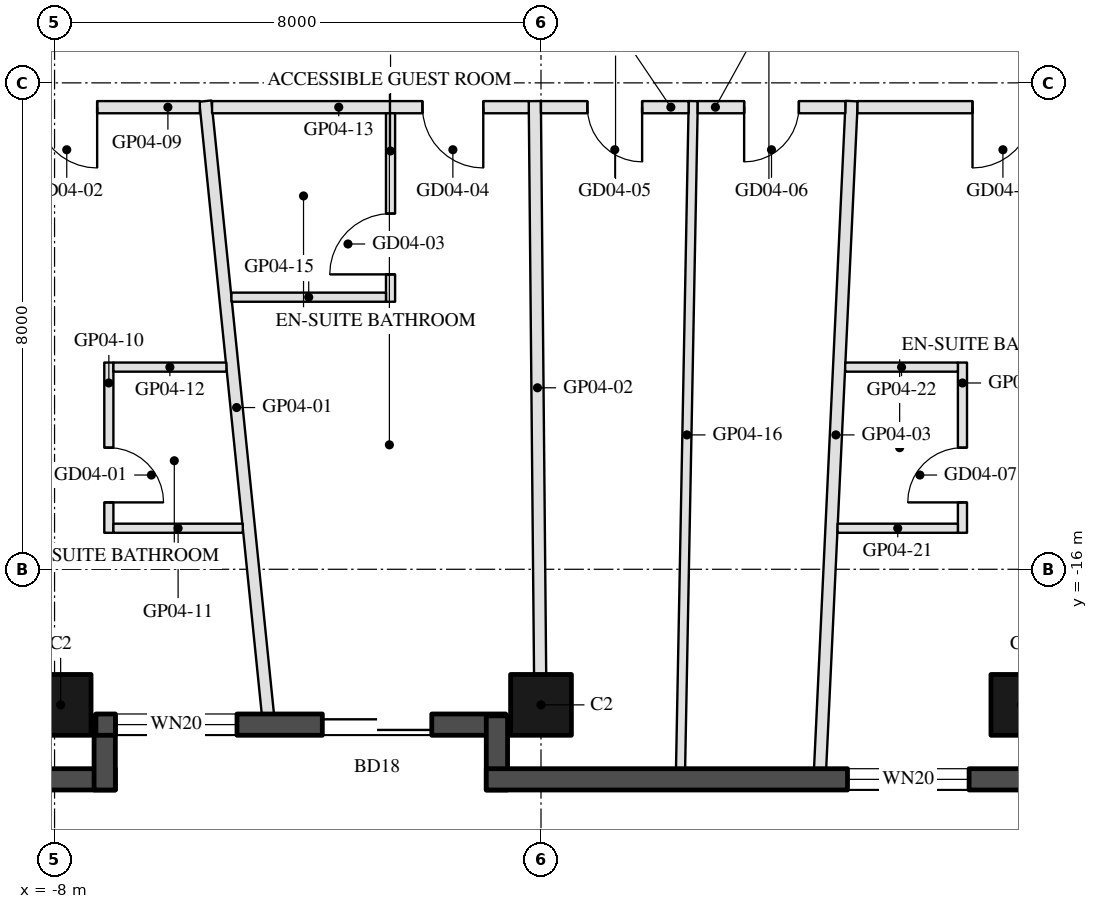
"""IFC4 building model, lengths in metres.
Left out: names, types, materials, properties, quantities, classifications, styles, units other than length and angle.
Written with IfcOpenShell. Run it as: python <this file> out.ifc"""

import sys

from ifc_helpers import new_model, si_unit, direction, frame, frame_2d, origin, origin_2d, place, context, subcontext, project, spatial, rectangle, hollow_rectangle, extrude, element, fill, save


model = new_model("IFC4")
c1 = context("Model", 3, precision=1e-05, world=origin(), true_north=direction((0.0, 1.0)))
c2 = subcontext(c1, "Body", "Model", "MODEL_VIEW")
j1 = project(units=[si_unit("LENGTHUNIT", "METRE"), si_unit("PLANEANGLEUNIT", "RADIAN")], contexts=[c1])
p1 = place(None, origin())
s1 = spatial("IfcSite", under=j1, at=p1, CompositionType="ELEMENT")
p2 = place(p1, origin())
s2 = spatial("IfcBuilding", under=s1, at=p2, CompositionType="ELEMENT")
p3 = place(p2, frame((0.0, 0.0, 72.4)))
s3 = spatial("IfcBuildingStorey", under=s2, at=p3, CompositionType="ELEMENT", Elevation=72.4)
for number, where, z_axis, x_axis in (
    (1, (-7.9, -18.23, 0.0), (0.0, 0.0, 1.0), (-1.0, 0.0, 0.0)),
    (2, (0.0, -18.23, 0.0), (0.0, 0.0, 1.0), (-1.0, 0.0, 0.0)),
    (3, (7.9, -18.23, 0.0), (0.0, 0.0, 1.0), (-1.0, 0.0, 0.0)),
):
    element("IfcColumn", number, at=place(p3, frame(where, z_axis=z_axis, x_axis=x_axis)), inside=s3, PredefinedType="COLUMN", context=c2, shape_type="SweptSolid", body=[
        extrude(hollow_rectangle(XDim=1.0, YDim=1.0, WallThickness=0.045, at=origin_2d()), origin(), (0.0, 0.0, 1.0), 3.7),
    ])
p4 = place(p3, frame((-18.816, -19.455, 0.0), z_axis=(0.0, 0.0, 1.0), x_axis=(1.0, 0.0, 0.0)))
e4 = element("IfcWall", 4, at=p4, inside=s3, PredefinedType="SOLIDWALL", context=c2, shape_type="SweptSolid", body=[
    extrude(rectangle(XDim=11.816, YDim=0.35, at=frame_2d((5.908, 0.0))), origin(), (0.0, 0.0, 1.0), 3.55),
])
p5 = place(p4, frame((0.381, 0.0, 0.3)))
e5 = element("IfcOpeningElement", 5, at=p5, cuts=e4, PredefinedType="OPENING", context=c2, shape_type="SweptSolid", body=[
    extrude(rectangle(XDim=1.7, YDim=2.65, at=frame_2d((0.85, 1.325))), frame((0.0, 0.185, 0.0), z_axis=(0.0, -1.0, 0.0), x_axis=(1.0, 0.0, 0.0)), (0.0, 0.0, 1.0), 0.37),
])
p6 = place(p4, frame((7.665, 0.0, 0.0)))
e6 = element("IfcOpeningElement", 6, at=p6, cuts=e4, PredefinedType="OPENING", context=c2, shape_type="SweptSolid", body=[
    extrude(rectangle(XDim=2.4, YDim=2.4, at=frame_2d((1.2, 1.2))), frame((0.0, 0.185, 0.0), z_axis=(0.0, -1.0, 0.0), x_axis=(1.0, 0.0, 0.0)), (0.0, 0.0, 1.0), 0.37),
])
p7 = place(p4, frame((3.866, 0.0, 0.3)))
e7 = element("IfcOpeningElement", 7, at=p7, cuts=e4, PredefinedType="OPENING", context=c2, shape_type="SweptSolid", body=[
    extrude(rectangle(XDim=1.5, YDim=2.65, at=frame_2d((0.75, 1.325))), frame((0.0, 0.185, 0.0), z_axis=(0.0, -1.0, 0.0), x_axis=(1.0, 0.0, 0.0)), (0.0, 0.0, 1.0), 0.37),
])
p8 = place(p4, frame((5.666, 0.0, 0.3)))
e8 = element("IfcOpeningElement", 8, at=p8, cuts=e4, PredefinedType="OPENING", context=c2, shape_type="SweptSolid", body=[
    extrude(rectangle(XDim=1.5, YDim=2.65, at=frame_2d((0.75, 1.325))), frame((0.0, 0.185, 0.0), z_axis=(0.0, -1.0, 0.0), x_axis=(1.0, 0.0, 0.0)), (0.0, 0.0, 1.0), 0.37),
])
p9 = place(p3, frame((-7.175, -19.63, 0.0), z_axis=(0.0, 0.0, 1.0), x_axis=(0.0, 1.0, 0.0)))
e9 = element("IfcWall", 9, at=p9, inside=s3, PredefinedType="SOLIDWALL", context=c2, shape_type="SweptSolid", body=[
    extrude(rectangle(XDim=1.22, YDim=0.35, at=frame_2d((0.61, 0.0))), origin(), (0.0, 0.0, 1.0), 3.55),
])
p10 = place(p3, frame((-7.32, -18.555, 0.0), z_axis=(0.0, 0.0, 1.0), x_axis=(1.0, 0.0, 0.0)))
e10 = element("IfcWall", 10, at=p10, inside=s3, PredefinedType="SOLIDWALL", context=c2, shape_type="SweptSolid", body=[
    extrude(rectangle(XDim=6.74, YDim=0.35, at=frame_2d((3.37, 0.0))), origin(), (0.0, 0.0, 1.0), 3.55),
])
p11 = place(p10, frame((0.32, 0.0, 0.3)))
e11 = element("IfcOpeningElement", 11, at=p11, cuts=e10, PredefinedType="OPENING", context=c2, shape_type="SweptSolid", body=[
    extrude(rectangle(XDim=2.0, YDim=2.65, at=frame_2d((1.0, 1.325))), frame((0.0, 0.185, 0.0), z_axis=(0.0, -1.0, 0.0), x_axis=(1.0, 0.0, 0.0)), (0.0, 0.0, 1.0), 0.37),
])
p12 = place(p10, frame((3.724, 0.0, 0.0)))
e12 = element("IfcOpeningElement", 12, at=p12, cuts=e10, PredefinedType="OPENING", context=c2, shape_type="SweptSolid", body=[
    extrude(rectangle(XDim=1.8, YDim=2.4, at=frame_2d((0.9, 1.2))), frame((0.0, 0.185, 0.0), z_axis=(0.0, -1.0, 0.0), x_axis=(1.0, 0.0, 0.0)), (0.0, 0.0, 1.0), 0.37),
])
p13 = place(p3, frame((-0.725, -18.41, 0.0), z_axis=(0.0, 0.0, 1.0), x_axis=(0.0, -1.0, 0.0)))
e13 = element("IfcWall", 13, at=p13, inside=s3, PredefinedType="SOLIDWALL", context=c2, shape_type="SweptSolid", body=[
    extrude(rectangle(XDim=1.22, YDim=0.35, at=frame_2d((0.61, 0.0))), origin(), (0.0, 0.0, 1.0), 3.55),
])
p14 = place(p3, frame((-0.9, -19.455, 0.0), z_axis=(0.0, 0.0, 1.0), x_axis=(1.0, 0.0, 0.0)))
e14 = element("IfcWall", 14, at=p14, inside=s3, PredefinedType="SOLIDWALL", context=c2, shape_type="SweptSolid", body=[
    extrude(rectangle(XDim=9.7, YDim=0.35, at=frame_2d((4.85, 0.0))), origin(), (0.0, 0.0, 1.0), 3.55),
])
p15 = place(p14, frame((5.94, 0.0, 0.3)))
e15 = element("IfcOpeningElement", 15, at=p15, cuts=e14, PredefinedType="OPENING", context=c2, shape_type="SweptSolid", body=[
    extrude(rectangle(XDim=2.0, YDim=2.65, at=frame_2d((1.0, 1.325))), frame((0.0, 0.185, 0.0), z_axis=(0.0, -1.0, 0.0), x_axis=(1.0, 0.0, 0.0)), (0.0, 0.0, 1.0), 0.37),
])
p16 = place(p3, frame((-4.492, -18.38, 0.0), z_axis=(0.0, 0.0, 1.0), x_axis=(-0.101538508549, 0.994831609511, 0.0)))
e16 = element("IfcWall", 16, at=p16, inside=s3, PredefinedType="PARTITIONING", context=c2, shape_type="SweptSolid", body=[
    extrude(rectangle(XDim=10.132, YDim=0.2, at=frame_2d((5.066, 0.0))), origin(), (0.0, 0.0, 1.0), 2.96),
])
p17 = place(p3, frame((-0.014, -17.73, 0.0), z_axis=(0.0, 0.0, 1.0), x_axis=(-0.00926821032, 0.999957049216, 0.0)))
e17 = element("IfcWall", 17, at=p17, inside=s3, PredefinedType="PARTITIONING", context=c2, shape_type="SweptSolid", body=[
    extrude(rectangle(XDim=9.43, YDim=0.2, at=frame_2d((4.715, 0.0))), origin(), (0.0, 0.0, 1.0), 2.95),
])
p18 = place(p3, frame((4.59, -19.28, 0.0), z_axis=(0.0, 0.0, 1.0), x_axis=(0.04726334954, 0.998882463451, 0.0)))
e18 = element("IfcWall", 18, at=p18, inside=s3, PredefinedType="PARTITIONING", context=c2, shape_type="SweptSolid", body=[
    extrude(rectangle(XDim=10.992, YDim=0.2, at=frame_2d((5.496, 0.0))), origin(), (0.0, 0.0, 1.0), 2.96),
])
p19 = place(p3, frame((-5.611, -8.4, 0.0), z_axis=(0.0, 0.0, 1.0), x_axis=(-1.0, 0.0, 0.0)))
e19 = element("IfcWall", 19, at=p19, inside=s3, PredefinedType="PARTITIONING", context=c2, shape_type="SweptSolid", body=[
    extrude(rectangle(XDim=4.378, YDim=0.2, at=frame_2d((2.189, 0.0))), origin(), (0.0, 0.0, 1.0), 2.95),
])
p20 = place(p19, frame((1.689, 0.0, 0.0)))
e20 = element("IfcOpeningElement", 20, at=p20, cuts=e19, PredefinedType="OPENING", context=c2, shape_type="SweptSolid", body=[
    extrude(rectangle(XDim=1.0, YDim=2.1, at=frame_2d((0.5, 1.05))), frame((0.0, 0.11, 0.0), z_axis=(0.0, -1.0, 0.0), x_axis=(1.0, 0.0, 0.0)), (0.0, 0.0, 1.0), 0.22),
])
p21 = place(p3, frame((-7.107, -12.6, 0.0), z_axis=(0.0, 0.0, 1.0), x_axis=(0.0, -1.0, 0.0)))
e21 = element("IfcWall", 21, at=p21, inside=s3, PredefinedType="PARTITIONING", context=c2, shape_type="SweptSolid", body=[
    extrude(rectangle(XDim=2.8, YDim=0.15, at=frame_2d((1.4, 0.0))), origin(), (0.0, 0.0, 1.0), 3.55),
])
p22 = place(p21, frame((1.4, 0.0, 0.0)))
e22 = element("IfcOpeningElement", 22, at=p22, cuts=e21, PredefinedType="OPENING", context=c2, shape_type="SweptSolid", body=[
    extrude(rectangle(XDim=0.9, YDim=2.1, at=frame_2d((0.45, 1.05))), frame((0.0, 0.085, 0.0), z_axis=(0.0, -1.0, 0.0), x_axis=(1.0, 0.0, 0.0)), (0.0, 0.0, 1.0), 0.17),
])
p23 = place(p3, frame((-7.032, -15.325, 0.0), z_axis=(0.0, 0.0, 1.0), x_axis=(1.0, 0.0, 0.0)))
e23 = element("IfcWall", 23, at=p23, inside=s3, PredefinedType="PARTITIONING", context=c2, shape_type="SweptSolid", body=[
    extrude(rectangle(XDim=2.128, YDim=0.15, at=frame_2d((1.064, 0.0))), origin(), (0.0, 0.0, 1.0), 3.55),
])
p24 = place(p3, frame((-7.032, -12.675, 0.0), z_axis=(0.0, 0.0, 1.0), x_axis=(1.0, 0.0, 0.0)))
e24 = element("IfcWall", 24, at=p24, inside=s3, PredefinedType="PARTITIONING", context=c2, shape_type="SweptSolid", body=[
    extrude(rectangle(XDim=1.858, YDim=0.15, at=frame_2d((0.929, 0.0))), origin(), (0.0, 0.0, 1.0), 3.55),
])
p25 = place(p3, frame((-0.201, -8.4, 0.0), z_axis=(0.0, 0.0, 1.0), x_axis=(-1.0, 0.0, 0.0)))
e25 = element("IfcWall", 25, at=p25, inside=s3, PredefinedType="PARTITIONING", context=c2, shape_type="SweptSolid", body=[
    extrude(rectangle(XDim=5.209, YDim=0.2, at=frame_2d((2.604, 0.0))), origin(), (0.0, 0.0, 1.0), 2.95),
])
p26 = place(p25, frame((0.749, 0.0, 0.0)))
e26 = element("IfcOpeningElement", 26, at=p26, cuts=e25, PredefinedType="OPENING", context=c2, shape_type="SweptSolid", body=[
    extrude(rectangle(XDim=1.0, YDim=2.1, at=frame_2d((0.5, 1.05))), frame((0.0, 0.11, 0.0), z_axis=(0.0, -1.0, 0.0), x_axis=(1.0, 0.0, 0.0)), (0.0, 0.0, 1.0), 0.22),
])
p27 = place(p3, frame((-2.475, -11.6, 0.0), z_axis=(0.0, 0.0, 1.0), x_axis=(0.0, 1.0, 0.0)))
e27 = element("IfcWall", 27, at=p27, inside=s3, PredefinedType="PARTITIONING", context=c2, shape_type="SweptSolid", body=[
    extrude(rectangle(XDim=3.1, YDim=0.15, at=frame_2d((1.55, 0.0))), origin(), (0.0, 0.0, 1.0), 3.55),
])
p28 = place(p27, frame((0.45, 0.0, 0.0)))
e28 = element("IfcOpeningElement", 28, at=p28, cuts=e27, PredefinedType="OPENING", context=c2, shape_type="SweptSolid", body=[
    extrude(rectangle(XDim=1.0, YDim=2.1, at=frame_2d((0.5, 1.05))), frame((0.0, 0.085, 0.0), z_axis=(0.0, -1.0, 0.0), x_axis=(1.0, 0.0, 0.0)), (0.0, 0.0, 1.0), 0.17),
])
p29 = place(p3, frame((-5.091, -11.525, 0.0), z_axis=(0.0, 0.0, 1.0), x_axis=(1.0, 0.0, 0.0)))
e29 = element("IfcWall", 29, at=p29, inside=s3, PredefinedType="PARTITIONING", context=c2, shape_type="SweptSolid", body=[
    extrude(rectangle(XDim=2.541, YDim=0.15, at=frame_2d((1.271, 0.0))), origin(), (0.0, 0.0, 1.0), 2.95),
])
p30 = place(p3, frame((2.295, -19.28, 0.0), z_axis=(0.0, 0.0, 1.0), x_axis=(0.01902977261, 0.999818917482, 0.0)))
e30 = element("IfcWall", 30, at=p30, inside=s3, PredefinedType="PARTITIONING", context=c2, shape_type="SweptSolid", body=[
    extrude(rectangle(XDim=10.982, YDim=0.15, at=frame_2d((5.491, 0.0))), origin(), (0.0, 0.0, 1.0), 2.96),
])
p31 = place(p3, frame((2.427, -8.4, 0.0), z_axis=(0.0, 0.0, 1.0), x_axis=(-1.0, 0.0, 0.0)))
e31 = element("IfcWall", 31, at=p31, inside=s3, PredefinedType="PARTITIONING", context=c2, shape_type="SweptSolid", body=[
    extrude(rectangle(XDim=2.428, YDim=0.2, at=frame_2d((1.214, 0.0))), origin(), (0.0, 0.0, 1.0), 2.95),
])
p32 = place(p31, frame((0.764, 0.0, 0.0)))
e32 = element("IfcOpeningElement", 32, at=p32, cuts=e31, PredefinedType="OPENING", context=c2, shape_type="SweptSolid", body=[
    extrude(rectangle(XDim=0.9, YDim=2.1, at=frame_2d((0.45, 1.05))), frame((0.0, 0.11, 0.0), z_axis=(0.0, -1.0, 0.0), x_axis=(1.0, 0.0, 0.0)), (0.0, 0.0, 1.0), 0.22),
])
p33 = place(p3, frame((5.005, -8.4, 0.0), z_axis=(0.0, 0.0, 1.0), x_axis=(-1.0, 0.0, 0.0)))
e33 = element("IfcWall", 33, at=p33, inside=s3, PredefinedType="PARTITIONING", context=c2, shape_type="SweptSolid", body=[
    extrude(rectangle(XDim=2.428, YDim=0.2, at=frame_2d((1.214, 0.0))), origin(), (0.0, 0.0, 1.0), 2.95),
])
p34 = place(p33, frame((0.764, 0.0, 0.0)))
e34 = element("IfcOpeningElement", 34, at=p34, cuts=e33, PredefinedType="OPENING", context=c2, shape_type="SweptSolid", body=[
    extrude(rectangle(XDim=0.9, YDim=2.1, at=frame_2d((0.45, 1.05))), frame((0.0, 0.11, 0.0), z_axis=(0.0, -1.0, 0.0), x_axis=(1.0, 0.0, 0.0)), (0.0, 0.0, 1.0), 0.22),
])
p35 = place(p3, frame((9.988, -8.4, 0.0), z_axis=(0.0, 0.0, 1.0), x_axis=(-1.0, 0.0, 0.0)))
e35 = element("IfcWall", 35, at=p35, inside=s3, PredefinedType="PARTITIONING", context=c2, shape_type="SweptSolid", body=[
    extrude(rectangle(XDim=4.783, YDim=0.2, at=frame_2d((2.392, 0.0))), origin(), (0.0, 0.0, 1.0), 2.95),
])
p36 = place(p35, frame((1.892, 0.0, 0.0)))
e36 = element("IfcOpeningElement", 36, at=p36, cuts=e35, PredefinedType="OPENING", context=c2, shape_type="SweptSolid", body=[
    extrude(rectangle(XDim=1.0, YDim=2.1, at=frame_2d((0.5, 1.05))), frame((0.0, 0.11, 0.0), z_axis=(0.0, -1.0, 0.0), x_axis=(1.0, 0.0, 0.0)), (0.0, 0.0, 1.0), 0.22),
])
p37 = place(p3, frame((6.931, -15.4, 0.0), z_axis=(0.0, 0.0, 1.0), x_axis=(0.0, 1.0, 0.0)))
e37 = element("IfcWall", 37, at=p37, inside=s3, PredefinedType="PARTITIONING", context=c2, shape_type="SweptSolid", body=[
    extrude(rectangle(XDim=2.8, YDim=0.15, at=frame_2d((1.4, 0.0))), origin(), (0.0, 0.0, 1.0), 3.55),
])
p38 = place(p37, frame((0.5, 0.0, 0.0)))
e38 = element("IfcOpeningElement", 38, at=p38, cuts=e37, PredefinedType="OPENING", context=c2, shape_type="SweptSolid", body=[
    extrude(rectangle(XDim=0.9, YDim=2.1, at=frame_2d((0.45, 1.05))), frame((0.0, 0.085, 0.0), z_axis=(0.0, -1.0, 0.0), x_axis=(1.0, 0.0, 0.0)), (0.0, 0.0, 1.0), 0.17),
])
p39 = place(p3, frame((4.877, -15.325, 0.0), z_axis=(0.0, 0.0, 1.0), x_axis=(1.0, 0.0, 0.0)))
e39 = element("IfcWall", 39, at=p39, inside=s3, PredefinedType="PARTITIONING", context=c2, shape_type="SweptSolid", body=[
    extrude(rectangle(XDim=1.979, YDim=0.15, at=frame_2d((0.99, 0.0))), origin(), (0.0, 0.0, 1.0), 3.55),
])
p40 = place(p3, frame((5.003, -12.675, 0.0), z_axis=(0.0, 0.0, 1.0), x_axis=(1.0, 0.0, 0.0)))
e40 = element("IfcWall", 40, at=p40, inside=s3, PredefinedType="PARTITIONING", context=c2, shape_type="SweptSolid", body=[
    extrude(rectangle(XDim=1.854, YDim=0.15, at=frame_2d((0.927, 0.0))), origin(), (0.0, 0.0, 1.0), 3.55),
])
p41 = place(p11, origin())
e41 = element("IfcWindow", 41, at=p41, inside=s3, PartitioningType="SINGLE_PANEL", PredefinedType="WINDOW", context=c2, shape_type="SweptSolid", body=[
    extrude(rectangle(XDim=2.0, YDim=2.65, at=frame_2d((1.0, 1.325))), frame((0.0, 0.03, 0.0), z_axis=(0.0, -1.0, 0.0), x_axis=(1.0, 0.0, 0.0)), (0.0, 0.0, 1.0), 0.06),
])
fill(e11, e41)
p42 = place(p12, frame((1.8, 0.0, 0.0), z_axis=(0.0, 0.0, 1.0), x_axis=(-1.0, 0.0, 0.0)))
e42 = element("IfcDoor", 42, at=p42, inside=s3, OperationType="SLIDING_TO_LEFT", PredefinedType="DOOR", context=c2, shape_type="SweptSolid", body=[
    extrude(rectangle(XDim=1.8, YDim=2.4, at=frame_2d((0.9, 1.2))), frame((0.0, 0.025, 0.0), z_axis=(0.0, -1.0, 0.0), x_axis=(1.0, 0.0, 0.0)), (0.0, 0.0, 1.0), 0.05),
])
fill(e12, e42)
p43 = place(p15, origin())
e43 = element("IfcWindow", 43, at=p43, inside=s3, PartitioningType="SINGLE_PANEL", PredefinedType="WINDOW", context=c2, shape_type="SweptSolid", body=[
    extrude(rectangle(XDim=2.0, YDim=2.65, at=frame_2d((1.0, 1.325))), frame((0.0, 0.03, 0.0), z_axis=(0.0, -1.0, 0.0), x_axis=(1.0, 0.0, 0.0)), (0.0, 0.0, 1.0), 0.06),
])
fill(e15, e43)
p44 = place(p22, origin())
e44 = element("IfcDoor", 44, at=p44, inside=s3, OperationType="SINGLE_SWING_RIGHT", PredefinedType="DOOR", context=c2, shape_type="SweptSolid", body=[
    extrude(rectangle(XDim=0.9, YDim=2.1, at=frame_2d((0.45, 1.05))), frame((0.0, 0.025, 0.0), z_axis=(0.0, -1.0, 0.0), x_axis=(1.0, 0.0, 0.0)), (0.0, 0.0, 1.0), 0.05),
])
fill(e22, e44)
p45 = place(p20, origin())
e45 = element("IfcDoor", 45, at=p45, inside=s3, OperationType="SINGLE_SWING_LEFT", PredefinedType="DOOR", context=c2, shape_type="SweptSolid", body=[
    extrude(rectangle(XDim=1.0, YDim=2.1, at=frame_2d((0.5, 1.05))), frame((0.0, 0.025, 0.0), z_axis=(0.0, -1.0, 0.0), x_axis=(1.0, 0.0, 0.0)), (0.0, 0.0, 1.0), 0.05),
])
fill(e20, e45)
p46 = place(p28, origin())
e46 = element("IfcDoor", 46, at=p46, inside=s3, OperationType="SINGLE_SWING_LEFT", PredefinedType="DOOR", context=c2, shape_type="SweptSolid", body=[
    extrude(rectangle(XDim=1.0, YDim=2.1, at=frame_2d((0.5, 1.05))), frame((0.0, 0.025, 0.0), z_axis=(0.0, -1.0, 0.0), x_axis=(1.0, 0.0, 0.0)), (0.0, 0.0, 1.0), 0.05),
])
fill(e28, e46)
p47 = place(p26, origin())
e47 = element("IfcDoor", 47, at=p47, inside=s3, OperationType="SINGLE_SWING_LEFT", PredefinedType="DOOR", context=c2, shape_type="SweptSolid", body=[
    extrude(rectangle(XDim=1.0, YDim=2.1, at=frame_2d((0.5, 1.05))), frame((0.0, 0.025, 0.0), z_axis=(0.0, -1.0, 0.0), x_axis=(1.0, 0.0, 0.0)), (0.0, 0.0, 1.0), 0.05),
])
fill(e26, e47)
p48 = place(p32, origin())
e48 = element("IfcDoor", 48, at=p48, inside=s3, OperationType="SINGLE_SWING_LEFT", PredefinedType="DOOR", context=c2, shape_type="SweptSolid", body=[
    extrude(rectangle(XDim=0.9, YDim=2.1, at=frame_2d((0.45, 1.05))), frame((0.0, 0.025, 0.0), z_axis=(0.0, -1.0, 0.0), x_axis=(1.0, 0.0, 0.0)), (0.0, 0.0, 1.0), 0.05),
])
fill(e32, e48)
p49 = place(p34, origin())
e49 = element("IfcDoor", 49, at=p49, inside=s3, OperationType="SINGLE_SWING_RIGHT", PredefinedType="DOOR", context=c2, shape_type="SweptSolid", body=[
    extrude(rectangle(XDim=0.9, YDim=2.1, at=frame_2d((0.45, 1.05))), frame((0.0, 0.025, 0.0), z_axis=(0.0, -1.0, 0.0), x_axis=(1.0, 0.0, 0.0)), (0.0, 0.0, 1.0), 0.05),
])
fill(e34, e49)
p50 = place(p38, origin())
e50 = element("IfcDoor", 50, at=p50, inside=s3, OperationType="SINGLE_SWING_LEFT", PredefinedType="DOOR", context=c2, shape_type="SweptSolid", body=[
    extrude(rectangle(XDim=0.9, YDim=2.1, at=frame_2d((0.45, 1.05))), frame((0.0, 0.025, 0.0), z_axis=(0.0, -1.0, 0.0), x_axis=(1.0, 0.0, 0.0)), (0.0, 0.0, 1.0), 0.05),
])
fill(e38, e50)
p51 = place(p36, origin())
e51 = element("IfcDoor", 51, at=p51, inside=s3, OperationType="SINGLE_SWING_RIGHT", PredefinedType="DOOR", context=c2, shape_type="SweptSolid", body=[
    extrude(rectangle(XDim=1.0, YDim=2.1, at=frame_2d((0.5, 1.05))), frame((0.0, 0.025, 0.0), z_axis=(0.0, -1.0, 0.0), x_axis=(1.0, 0.0, 0.0)), (0.0, 0.0, 1.0), 0.05),
])
fill(e36, e51)
save(model, sys.argv[1])
